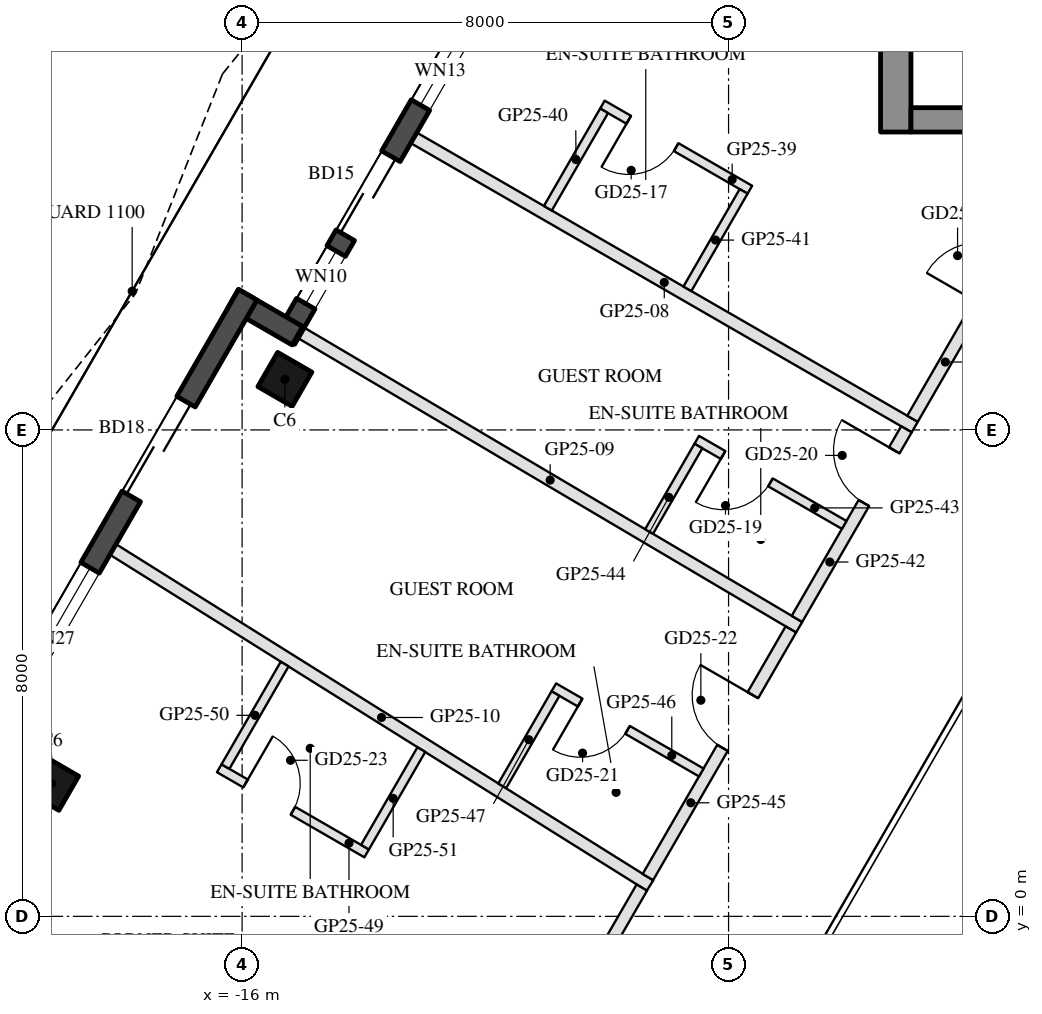
"""IFC4 building model, lengths in metres.
Left out: names, types, materials, properties, quantities, classifications, styles, units other than length and angle.
Written with IfcOpenShell. Run it as: python <this file> out.ifc"""

import sys

from ifc_helpers import new_model, si_unit, direction, frame, frame_2d, origin, origin_2d, place, context, subcontext, project, spatial, rectangle, hollow_rectangle, extrude, boolean, halfspace, element, fill, save


model = new_model("IFC4")
c1 = context("Model", 3, precision=1e-05, world=origin(), true_north=direction((0.0, 1.0)))
c2 = subcontext(c1, "Body", "Model", "MODEL_VIEW")
j1 = project(units=[si_unit("LENGTHUNIT", "METRE"), si_unit("PLANEANGLEUNIT", "RADIAN")], contexts=[c1])
p1 = place(None, origin())
s1 = spatial("IfcSite", under=j1, at=p1, CompositionType="ELEMENT")
p2 = place(p1, origin())
s2 = spatial("IfcBuilding", under=s1, at=p2, CompositionType="ELEMENT")
p3 = place(p2, frame((0.0, 0.0, 257.8)))
s3 = spatial("IfcBuildingStorey", under=s2, at=p3, CompositionType="ELEMENT", Elevation=257.8)
p4 = place(p3, frame((-15.296, 8.832, 0.0), z_axis=(0.0, 0.0, 1.0), x_axis=(0.5, 0.866025403784, 0.0)))
e1 = element("IfcColumn", 1, at=p4, inside=s3, PredefinedType="COLUMN", context=c2, shape_type="SweptSolid", body=[
    boolean("DIFFERENCE", extrude(hollow_rectangle(XDim=0.65, YDim=0.65, WallThickness=0.03, at=origin_2d()), origin(), (0.0, 0.0, 1.0), 3.7), halfspace(frame((0.0, 0.0, 0.037), z_axis=(0.0, 0.0, 1.0), x_axis=(1.0, 0.0, 0.0)), True)),
])
p5 = place(p3, frame((-19.132, 2.188, 0.0), z_axis=(0.0, 0.0, 1.0), x_axis=(0.5, 0.866025403784, 0.0)))
e2 = element("IfcColumn", 2, at=p5, inside=s3, PredefinedType="COLUMN", context=c2, shape_type="SweptSolid", body=[
    boolean("DIFFERENCE", extrude(hollow_rectangle(XDim=0.65, YDim=0.65, WallThickness=0.03, at=origin_2d()), origin(), (0.0, 0.0, 1.0), 3.7), halfspace(frame((0.0, 0.0, 0.04), z_axis=(0.0, 0.0, 1.0), x_axis=(1.0, 0.0, 0.0)), True)),
])
p6 = place(p3, frame((-12.032, 15.136, 0.0), z_axis=(0.0, 0.0, 1.0), x_axis=(-0.500005870429, -0.866022014464, 0.0)))
e3 = element("IfcWall", 3, at=p6, inside=s3, PredefinedType="SOLIDWALL", context=c2, shape_type="SweptSolid", body=[
    extrude(rectangle(XDim=6.512, YDim=0.35, at=frame_2d((3.256, 0.0))), origin(), (0.0, 0.0, 1.0), 3.55),
])
p7 = place(p6, frame((0.77, 0.0, 0.3)))
e4 = element("IfcOpeningElement", 4, at=p7, cuts=e3, PredefinedType="OPENING", context=c2, shape_type="SweptSolid", body=[
    extrude(rectangle(XDim=1.3, YDim=2.65, at=frame_2d((0.65, 1.325))), frame((0.0, 0.185, 0.0), z_axis=(0.0, -1.0, 0.0), x_axis=(1.0, 0.0, 0.0)), (0.0, 0.0, 1.0), 0.37),
])
p8 = place(p6, frame((3.042, 0.0, 0.0)))
e5 = element("IfcOpeningElement", 5, at=p8, cuts=e3, PredefinedType="OPENING", context=c2, shape_type="SweptSolid", body=[
    extrude(rectangle(XDim=1.5, YDim=2.4, at=frame_2d((0.75, 1.2))), frame((0.0, 0.185, 0.0), z_axis=(0.0, -1.0, 0.0), x_axis=(1.0, 0.0, 0.0)), (0.0, 0.0, 1.0), 0.37),
])
p9 = place(p6, frame((4.842, 0.0, 0.3)))
e6 = element("IfcOpeningElement", 6, at=p9, cuts=e3, PredefinedType="OPENING", context=c2, shape_type="SweptSolid", body=[
    extrude(rectangle(XDim=1.0, YDim=2.65, at=frame_2d((0.5, 1.325))), frame((0.0, 0.185, 0.0), z_axis=(0.0, -1.0, 0.0), x_axis=(1.0, 0.0, 0.0)), (0.0, 0.0, 1.0), 0.37),
])
p10 = place(p3, frame((-15.09, 9.549, 0.0), z_axis=(0.0, 0.0, 1.0), x_axis=(-0.866092288191, 0.499884134912, 0.0)))
e7 = element("IfcWall", 7, at=p10, inside=s3, PredefinedType="SOLIDWALL", context=c2, shape_type="SweptSolid", body=[
    extrude(rectangle(XDim=1.22, YDim=0.35, at=frame_2d((0.61, 0.0))), origin(), (0.0, 0.0, 1.0), 3.55),
])
p11 = place(p3, frame((-15.907, 10.223, 0.0), z_axis=(0.0, 0.0, 1.0), x_axis=(-0.499992427901, -0.866029775494, 0.0)))
e8 = element("IfcWall", 8, at=p11, inside=s3, PredefinedType="SOLIDWALL", context=c2, shape_type="SweptSolid", body=[
    extrude(rectangle(XDim=9.472, YDim=0.35, at=frame_2d((4.736, 0.0))), origin(), (0.0, 0.0, 1.0), 3.55),
])
p12 = place(p11, frame((2.03, 0.0, 0.0)))
e9 = element("IfcOpeningElement", 9, at=p12, cuts=e8, PredefinedType="OPENING", context=c2, shape_type="SweptSolid", body=[
    extrude(rectangle(XDim=1.8, YDim=2.4, at=frame_2d((0.9, 1.2))), frame((0.0, 0.185, 0.0), z_axis=(0.0, -1.0, 0.0), x_axis=(1.0, 0.0, 0.0)), (0.0, 0.0, 1.0), 0.37),
])
p13 = place(p11, frame((5.186, 0.0, 0.3)))
e10 = element("IfcOpeningElement", 10, at=p13, cuts=e8, PredefinedType="OPENING", context=c2, shape_type="SweptSolid", body=[
    extrude(rectangle(XDim=2.7, YDim=2.65, at=frame_2d((1.35, 1.325))), frame((0.0, 0.185, 0.0), z_axis=(0.0, -1.0, 0.0), x_axis=(1.0, 0.0, 0.0)), (0.0, 0.0, 1.0), 0.37),
])
p14 = place(p3, frame((-5.25, 12.9, 0.0), z_axis=(0.0, 0.0, 1.0), x_axis=(0.0, 1.0, 0.0)))
e11 = element("IfcWall", 11, at=p14, inside=s3, PredefinedType="SHEAR", context=c2, shape_type="SweptSolid", body=[
    extrude(rectangle(XDim=13.934, YDim=0.5, at=frame_2d((6.967, 0.0))), origin(), (0.0, 0.0, 1.0), 3.5),
])
p15 = place(p3, frame((5.0, 13.1, 0.0), z_axis=(0.0, 0.0, 1.0), x_axis=(-1.0, 0.0, 0.0)))
e12 = element("IfcWall", 12, at=p15, inside=s3, PredefinedType="SHEAR", context=c2, shape_type="SweptSolid", body=[
    extrude(rectangle(XDim=10.0, YDim=0.4, at=frame_2d((5.0, 0.0))), origin(), (0.0, 0.0, 1.0), 3.5),
])
p16 = place(p15, frame((3.55, 0.0, 0.0)))
e13 = element("IfcOpeningElement", 13, at=p16, cuts=e12, PredefinedType="OPENING", context=c2, shape_type="SweptSolid", body=[
    extrude(rectangle(XDim=1.1, YDim=2.1, at=frame_2d((0.55, 1.05))), frame((0.0, 0.21, 0.0), z_axis=(0.0, -1.0, 0.0), x_axis=(1.0, 0.0, 0.0)), (0.0, 0.0, 1.0), 0.42),
])
p17 = place(p15, frame((5.85, 0.0, 0.0)))
e14 = element("IfcOpeningElement", 14, at=p17, cuts=e12, PredefinedType="OPENING", context=c2, shape_type="SweptSolid", body=[
    extrude(rectangle(XDim=1.4, YDim=2.1, at=frame_2d((0.7, 1.05))), frame((0.0, 0.21, 0.0), z_axis=(0.0, -1.0, 0.0), x_axis=(1.0, 0.0, 0.0)), (0.0, 0.0, 1.0), 0.42),
])
p18 = place(p3, frame((-13.177, 12.804, 0.0), z_axis=(0.0, 0.0, 1.0), x_axis=(0.866021901412, -0.500006066238, 0.0)))
e15 = element("IfcWall", 15, at=p18, inside=s3, PredefinedType="PARTITIONING", context=c2, shape_type="SweptSolid", body=[
    extrude(rectangle(XDim=9.513, YDim=0.2, at=frame_2d((4.757, 0.0))), origin(), (0.0, 0.0, 1.0), 3.16),
])
p19 = place(p3, frame((-15.029, 9.596, 0.0), z_axis=(0.0, 0.0, 1.0), x_axis=(0.860830464323, -0.508891846754, 0.0)))
e16 = element("IfcWall", 16, at=p19, inside=s3, PredefinedType="PARTITIONING", context=c2, shape_type="SweptSolid", body=[
    extrude(rectangle(XDim=9.513, YDim=0.2, at=frame_2d((4.757, 0.0))), origin(), (0.0, 0.0, 1.0), 3.16),
])
p20 = place(p3, frame((-18.124, 6.034, 0.0), z_axis=(0.0, 0.0, 1.0), x_axis=(0.847667734063, -0.530527485271, 0.0)))
e17 = element("IfcWall", 17, at=p20, inside=s3, PredefinedType="PARTITIONING", context=c2, shape_type="SweptSolid", body=[
    extrude(rectangle(XDim=10.419, YDim=0.2, at=frame_2d((5.21, 0.0))), origin(), (0.0, 0.0, 1.0), 3.0),
])
p21 = place(p3, frame((-4.975, 8.184, 0.0), z_axis=(0.0, 0.0, 1.0), x_axis=(0.499983925036, 0.86603468447, 0.0)))
e18 = element("IfcWall", 18, at=p21, inside=s3, PredefinedType="PARTITIONING", context=c2, shape_type="SweptSolid", body=[
    extrude(rectangle(XDim=5.388, YDim=0.2, at=frame_2d((2.694, 0.0))), origin(), (0.0, 0.0, 1.0), 3.0),
])
p22 = place(p21, frame((2.194, 0.0, 0.0)))
e19 = element("IfcOpeningElement", 19, at=p22, cuts=e18, PredefinedType="OPENING", context=c2, shape_type="SweptSolid", body=[
    extrude(rectangle(XDim=1.0, YDim=2.1, at=frame_2d((0.5, 1.05))), frame((0.0, 0.11, 0.0), z_axis=(0.0, -1.0, 0.0), x_axis=(1.0, 0.0, 0.0)), (0.0, 0.0, 1.0), 0.22),
])
p23 = place(p3, frame((-7.649, 11.951, 0.0), z_axis=(0.0, 0.0, 1.0), x_axis=(-0.865996816683, 0.500049511043, 0.0)))
e20 = element("IfcWall", 20, at=p23, inside=s3, PredefinedType="PARTITIONING", context=c2, shape_type="SweptSolid", body=[
    extrude(rectangle(XDim=2.8, YDim=0.15, at=frame_2d((1.4, 0.0))), origin(), (0.0, 0.0, 1.0), 3.55),
])
p24 = place(p23, frame((1.4, 0.0, 0.0)))
e21 = element("IfcOpeningElement", 21, at=p24, cuts=e20, PredefinedType="OPENING", context=c2, shape_type="SweptSolid", body=[
    extrude(rectangle(XDim=0.9, YDim=2.1, at=frame_2d((0.45, 1.05))), frame((0.0, 0.085, 0.0), z_axis=(0.0, -1.0, 0.0), x_axis=(1.0, 0.0, 0.0)), (0.0, 0.0, 1.0), 0.17),
])
for number, where, z_axis, x_axis in (
    (22, (-10.047, 13.248, 0.0), (0.0, 0.0, 1.0), (-0.5, -0.866, 0.0)),
    (23, (-7.752, 11.923, 0.0), (0.0, 0.0, 1.0), (-0.5, -0.866, 0.0)),
):
    element("IfcWall", number, at=place(p3, frame(where, z_axis=z_axis, x_axis=x_axis)), inside=s3, PredefinedType="PARTITIONING", context=c2, shape_type="SweptSolid", body=[
        extrude(rectangle(XDim=1.85, YDim=0.15, at=frame_2d((0.925, 0.0))), origin(), (0.0, 0.0, 1.0), 3.55),
    ])
p25 = place(p3, frame((-6.875, 4.892, 0.0), z_axis=(0.0, 0.0, 1.0), x_axis=(0.499945471869, 0.866056883327, 0.0)))
e24 = element("IfcWall", 24, at=p25, inside=s3, PredefinedType="PARTITIONING", context=c2, shape_type="SweptSolid", body=[
    extrude(rectangle(XDim=3.601, YDim=0.2, at=frame_2d((1.801, 0.0))), origin(), (0.0, 0.0, 1.0), 3.0),
])
p26 = place(p25, frame((2.201, 0.0, 0.0)))
e25 = element("IfcOpeningElement", 25, at=p26, cuts=e24, PredefinedType="OPENING", context=c2, shape_type="SweptSolid", body=[
    extrude(rectangle(XDim=1.0, YDim=2.1, at=frame_2d((0.5, 1.05))), frame((0.0, 0.11, 0.0), z_axis=(0.0, -1.0, 0.0), x_axis=(1.0, 0.0, 0.0)), (0.0, 0.0, 1.0), 0.22),
])
p27 = place(p3, frame((-6.098, 6.438, 0.0), z_axis=(0.0, 0.0, 1.0), x_axis=(-0.866018616679, 0.500011755427, 0.0)))
e26 = element("IfcWall", 26, at=p27, inside=s3, PredefinedType="PARTITIONING", context=c2, shape_type="SweptSolid", body=[
    extrude(rectangle(XDim=2.8, YDim=0.15, at=frame_2d((1.4, 0.0))), origin(), (0.0, 0.0, 1.0), 3.55),
])
p28 = place(p27, frame((1.4, 0.0, 0.0)))
e27 = element("IfcOpeningElement", 27, at=p28, cuts=e26, PredefinedType="OPENING", context=c2, shape_type="SweptSolid", body=[
    extrude(rectangle(XDim=0.9, YDim=2.1, at=frame_2d((0.45, 1.05))), frame((0.0, 0.085, 0.0), z_axis=(0.0, -1.0, 0.0), x_axis=(1.0, 0.0, 0.0)), (0.0, 0.0, 1.0), 0.17),
])
p29 = place(p3, frame((-8.496, 7.735, 0.0), z_axis=(0.0, 0.0, 1.0), x_axis=(-0.500021943523, -0.866012734315, 0.0)))
e28 = element("IfcWall", 28, at=p29, inside=s3, PredefinedType="PARTITIONING", context=c2, shape_type="SweptSolid", body=[
    extrude(rectangle(XDim=1.623, YDim=0.15, at=frame_2d((0.812, 0.0))), origin(), (0.0, 0.0, 1.0), 3.55),
])
p30 = place(p3, frame((-9.326, 0.646, 0.0), z_axis=(0.0, 0.0, 1.0), x_axis=(0.500008572427, 0.866020454435, 0.0)))
e29 = element("IfcWall", 29, at=p30, inside=s3, PredefinedType="PARTITIONING", context=c2, shape_type="SweptSolid", body=[
    extrude(rectangle(XDim=4.703, YDim=0.2, at=frame_2d((2.351, 0.0))), origin(), (0.0, 0.0, 1.0), 3.0),
])
p31 = place(p30, frame((2.454, 0.0, 0.0)))
e30 = element("IfcOpeningElement", 30, at=p31, cuts=e29, PredefinedType="OPENING", context=c2, shape_type="SweptSolid", body=[
    extrude(rectangle(XDim=1.0, YDim=2.1, at=frame_2d((0.5, 1.05))), frame((0.0, 0.11, 0.0), z_axis=(0.0, -1.0, 0.0), x_axis=(1.0, 0.0, 0.0)), (0.0, 0.0, 1.0), 0.22),
])
p32 = place(p3, frame((-8.449, 2.366, 0.0), z_axis=(0.0, 0.0, 1.0), x_axis=(-0.866034573852, 0.49998411664, 0.0)))
e31 = element("IfcWall", 31, at=p32, inside=s3, PredefinedType="PARTITIONING", context=c2, shape_type="SweptSolid", body=[
    extrude(rectangle(XDim=2.8, YDim=0.15, at=frame_2d((1.4, 0.0))), origin(), (0.0, 0.0, 1.0), 3.55),
])
p33 = place(p32, frame((1.4, 0.0, 0.0)))
e32 = element("IfcOpeningElement", 32, at=p33, cuts=e31, PredefinedType="OPENING", context=c2, shape_type="SweptSolid", body=[
    extrude(rectangle(XDim=0.9, YDim=2.1, at=frame_2d((0.45, 1.05))), frame((0.0, 0.085, 0.0), z_axis=(0.0, -1.0, 0.0), x_axis=(1.0, 0.0, 0.0)), (0.0, 0.0, 1.0), 0.17),
])
p34 = place(p3, frame((-10.846, 3.664, 0.0), z_axis=(0.0, 0.0, 1.0), x_axis=(-0.499899295206, -0.866083537918, 0.0)))
e33 = element("IfcWall", 33, at=p34, inside=s3, PredefinedType="PARTITIONING", context=c2, shape_type="SweptSolid", body=[
    extrude(rectangle(XDim=1.753, YDim=0.15, at=frame_2d((0.876, 0.0))), origin(), (0.0, 0.0, 1.0), 3.0),
])
p35 = place(p3, frame((-12.269, -4.45, 0.0), z_axis=(0.0, 0.0, 1.0), x_axis=(0.500009958894, 0.866019653938, 0.0)))
e34 = element("IfcWall", 34, at=p35, inside=s3, PredefinedType="PARTITIONING", context=c2, shape_type="SweptSolid", body=[
    extrude(rectangle(XDim=5.685, YDim=0.2, at=frame_2d((2.842, 0.0))), origin(), (0.0, 0.0, 1.0), 3.0),
])
p36 = place(p35, frame((2.342, 0.0, 0.0)))
e35 = element("IfcOpeningElement", 35, at=p36, cuts=e34, PredefinedType="OPENING", context=c2, shape_type="SweptSolid", body=[
    extrude(rectangle(XDim=1.0, YDim=2.1, at=frame_2d((0.5, 1.05))), frame((0.0, 0.11, 0.0), z_axis=(0.0, -1.0, 0.0), x_axis=(1.0, 0.0, 0.0)), (0.0, 0.0, 1.0), 0.22),
])
p37 = place(p3, frame((-16.376, 2.436, 0.0), z_axis=(0.0, 0.0, 1.0), x_axis=(0.865996816683, -0.500049511043, 0.0)))
e36 = element("IfcWall", 36, at=p37, inside=s3, PredefinedType="PARTITIONING", context=c2, shape_type="SweptSolid", body=[
    extrude(rectangle(XDim=2.8, YDim=0.15, at=frame_2d((1.4, 0.0))), origin(), (0.0, 0.0, 1.0), 3.55),
])
p38 = place(p37, frame((0.5, 0.0, 0.0)))
e37 = element("IfcOpeningElement", 37, at=p38, cuts=e36, PredefinedType="OPENING", context=c2, shape_type="SweptSolid", body=[
    extrude(rectangle(XDim=0.9, YDim=2.1, at=frame_2d((0.45, 1.05))), frame((0.0, 0.085, 0.0), z_axis=(0.0, -1.0, 0.0), x_axis=(1.0, 0.0, 0.0)), (0.0, 0.0, 1.0), 0.17),
])
p39 = place(p3, frame((-15.3, 4.149, 0.0), z_axis=(0.0, 0.0, 1.0), x_axis=(-0.49987439993, -0.866097906876, 0.0)))
e38 = element("IfcWall", 38, at=p39, inside=s3, PredefinedType="PARTITIONING", context=c2, shape_type="SweptSolid", body=[
    extrude(rectangle(XDim=1.947, YDim=0.15, at=frame_2d((0.974, 0.0))), origin(), (0.0, 0.0, 1.0), 3.55),
])
p40 = place(p3, frame((-13.052, 2.742, 0.0), z_axis=(0.0, 0.0, 1.0), x_axis=(-0.499965806267, -0.866045144646, 0.0)))
e39 = element("IfcWall", 39, at=p40, inside=s3, PredefinedType="PARTITIONING", context=c2, shape_type="SweptSolid", body=[
    extrude(rectangle(XDim=1.853, YDim=0.15, at=frame_2d((0.926, 0.0))), origin(), (0.0, 0.0, 1.0), 3.55),
])
p41 = place(p7, origin())
e40 = element("IfcWindow", 40, at=p41, inside=s3, PartitioningType="SINGLE_PANEL", PredefinedType="WINDOW", context=c2, shape_type="SweptSolid", body=[
    extrude(rectangle(XDim=1.3, YDim=2.65, at=frame_2d((0.65, 1.325))), frame((0.0, 0.03, 0.0), z_axis=(0.0, -1.0, 0.0), x_axis=(1.0, 0.0, 0.0)), (0.0, 0.0, 1.0), 0.06),
])
fill(e4, e40)
p42 = place(p8, frame((1.5, 0.0, 0.0), z_axis=(0.0, 0.0, 1.0), x_axis=(-1.0, 0.0, 0.0)))
e41 = element("IfcDoor", 41, at=p42, inside=s3, OperationType="SLIDING_TO_LEFT", PredefinedType="DOOR", context=c2, shape_type="SweptSolid", body=[
    extrude(rectangle(XDim=1.5, YDim=2.4, at=frame_2d((0.75, 1.2))), frame((0.0, 0.025, 0.0), z_axis=(0.0, -1.0, 0.0), x_axis=(1.0, 0.0, 0.0)), (0.0, 0.0, 1.0), 0.05),
])
fill(e5, e41)
p43 = place(p9, origin())
e42 = element("IfcWindow", 42, at=p43, inside=s3, PartitioningType="SINGLE_PANEL", PredefinedType="WINDOW", context=c2, shape_type="SweptSolid", body=[
    extrude(rectangle(XDim=1.0, YDim=2.65, at=frame_2d((0.5, 1.325))), frame((0.0, 0.03, 0.0), z_axis=(0.0, -1.0, 0.0), x_axis=(1.0, 0.0, 0.0)), (0.0, 0.0, 1.0), 0.06),
])
fill(e6, e42)
p44 = place(p12, frame((1.8, 0.0, 0.0), z_axis=(0.0, 0.0, 1.0), x_axis=(-1.0, 0.0, 0.0)))
e43 = element("IfcDoor", 43, at=p44, inside=s3, OperationType="SLIDING_TO_LEFT", PredefinedType="DOOR", context=c2, shape_type="SweptSolid", body=[
    extrude(rectangle(XDim=1.8, YDim=2.4, at=frame_2d((0.9, 1.2))), frame((0.0, 0.025, 0.0), z_axis=(0.0, -1.0, 0.0), x_axis=(1.0, 0.0, 0.0)), (0.0, 0.0, 1.0), 0.05),
])
fill(e9, e43)
p45 = place(p13, origin())
e44 = element("IfcWindow", 44, at=p45, inside=s3, PartitioningType="SINGLE_PANEL", PredefinedType="WINDOW", context=c2, shape_type="SweptSolid", body=[
    extrude(rectangle(XDim=2.7, YDim=2.65, at=frame_2d((1.35, 1.325))), frame((0.0, 0.03, 0.0), z_axis=(0.0, -1.0, 0.0), x_axis=(1.0, 0.0, 0.0)), (0.0, 0.0, 1.0), 0.06),
])
fill(e10, e44)
p46 = place(p24, origin())
e45 = element("IfcDoor", 45, at=p46, inside=s3, OperationType="SINGLE_SWING_RIGHT", PredefinedType="DOOR", context=c2, shape_type="SweptSolid", body=[
    extrude(rectangle(XDim=0.9, YDim=2.1, at=frame_2d((0.45, 1.05))), frame((0.0, 0.025, 0.0), z_axis=(0.0, -1.0, 0.0), x_axis=(1.0, 0.0, 0.0)), (0.0, 0.0, 1.0), 0.05),
])
fill(e21, e45)
p47 = place(p28, origin())
e46 = element("IfcDoor", 46, at=p47, inside=s3, OperationType="SINGLE_SWING_RIGHT", PredefinedType="DOOR", context=c2, shape_type="SweptSolid", body=[
    extrude(rectangle(XDim=0.9, YDim=2.1, at=frame_2d((0.45, 1.05))), frame((0.0, 0.025, 0.0), z_axis=(0.0, -1.0, 0.0), x_axis=(1.0, 0.0, 0.0)), (0.0, 0.0, 1.0), 0.05),
])
fill(e27, e46)
p48 = place(p26, origin())
e47 = element("IfcDoor", 47, at=p48, inside=s3, OperationType="SINGLE_SWING_RIGHT", PredefinedType="DOOR", context=c2, shape_type="SweptSolid", body=[
    extrude(rectangle(XDim=1.0, YDim=2.1, at=frame_2d((0.5, 1.05))), frame((0.0, 0.025, 0.0), z_axis=(0.0, -1.0, 0.0), x_axis=(1.0, 0.0, 0.0)), (0.0, 0.0, 1.0), 0.05),
])
fill(e25, e47)
p49 = place(p33, origin())
e48 = element("IfcDoor", 48, at=p49, inside=s3, OperationType="SINGLE_SWING_RIGHT", PredefinedType="DOOR", context=c2, shape_type="SweptSolid", body=[
    extrude(rectangle(XDim=0.9, YDim=2.1, at=frame_2d((0.45, 1.05))), frame((0.0, 0.025, 0.0), z_axis=(0.0, -1.0, 0.0), x_axis=(1.0, 0.0, 0.0)), (0.0, 0.0, 1.0), 0.05),
])
fill(e32, e48)
p50 = place(p31, origin())
e49 = element("IfcDoor", 49, at=p50, inside=s3, OperationType="SINGLE_SWING_RIGHT", PredefinedType="DOOR", context=c2, shape_type="SweptSolid", body=[
    extrude(rectangle(XDim=1.0, YDim=2.1, at=frame_2d((0.5, 1.05))), frame((0.0, 0.025, 0.0), z_axis=(0.0, -1.0, 0.0), x_axis=(1.0, 0.0, 0.0)), (0.0, 0.0, 1.0), 0.05),
])
fill(e30, e49)
p51 = place(p38, origin())
e50 = element("IfcDoor", 50, at=p51, inside=s3, OperationType="SINGLE_SWING_LEFT", PredefinedType="DOOR", context=c2, shape_type="SweptSolid", body=[
    extrude(rectangle(XDim=0.9, YDim=2.1, at=frame_2d((0.45, 1.05))), frame((0.0, 0.025, 0.0), z_axis=(0.0, -1.0, 0.0), x_axis=(1.0, 0.0, 0.0)), (0.0, 0.0, 1.0), 0.05),
])
fill(e37, e50)
save(model, sys.argv[1])
